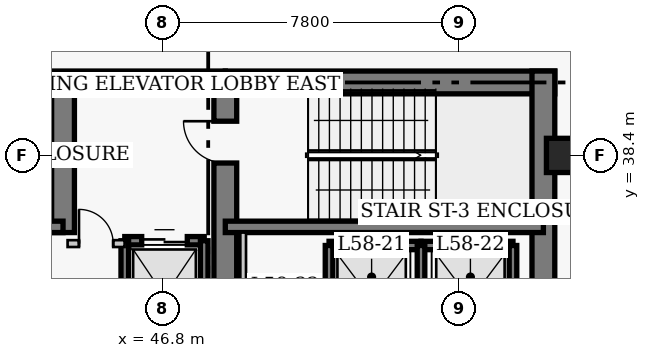
"""IFC4 building model, lengths in metres.
Left out: names, types, materials, properties, quantities, classifications, styles, units other than length and angle.
Written with IfcOpenShell. Run it as: python <this file> out.ifc"""

import sys

from ifc_helpers import new_model, si_unit, direction, frame, frame_2d, origin, origin_2d, place, context, subcontext, project, spatial, rectangle, extrude, element, fill, save


model = new_model("IFC4")
c1 = context("Model", 3, precision=1e-05, world=origin(), true_north=direction((0.0, 1.0)))
c2 = subcontext(c1, "Body", "Model", "MODEL_VIEW")
j1 = project(units=[si_unit("LENGTHUNIT", "METRE"), si_unit("PLANEANGLEUNIT", "RADIAN")], contexts=[c1])
p1 = place(None, origin())
s1 = spatial("IfcSite", under=j1, at=p1, CompositionType="ELEMENT")
p2 = place(p1, origin())
s2 = spatial("IfcBuilding", under=s1, at=p2, CompositionType="ELEMENT")
p3 = place(p2, frame((0.0, 0.0, 231.9)))
s3 = spatial("IfcBuildingStorey", under=s2, at=p3, CompositionType="ELEMENT", Elevation=231.9)
p4 = place(p3, frame((35.85, 40.32, 0.0), z_axis=(0.0, 0.0, 1.0), x_axis=(1.0, 0.0, 0.0)))
e1 = element("IfcWall", 1, at=p4, inside=s3, PredefinedType="SHEAR", context=c2, shape_type="SweptSolid", body=[
    extrude(rectangle(XDim=12.6, YDim=0.6, at=frame_2d((6.3, 0.0))), origin(), (0.0, 0.0, 1.0), 4.6),
])
p5 = place(p3, frame((48.45, 40.32, 0.0), z_axis=(0.0, 0.0, 1.0), x_axis=(1.0, 0.0, 0.0)))
e2 = element("IfcWall", 2, at=p5, inside=s3, PredefinedType="SHEAR", context=c2, shape_type="SweptSolid", body=[
    extrude(rectangle(XDim=8.67, YDim=0.6, at=frame_2d((4.335, 0.0))), origin(), (0.0, 0.0, 1.0), 4.6),
])
p6 = place(p3, frame((56.82, 27.05, 0.0), z_axis=(0.0, 0.0, 1.0), x_axis=(0.0, 1.0, 0.0)))
e3 = element("IfcWall", 3, at=p6, inside=s3, PredefinedType="SHEAR", context=c2, shape_type="SweptSolid", body=[
    extrude(rectangle(XDim=13.57, YDim=0.6, at=frame_2d((6.785, 0.0))), origin(), (0.0, 0.0, 1.0), 4.6),
])
p7 = place(p3, frame((44.18, 36.37, 0.0), z_axis=(0.0, 0.0, 1.0), x_axis=(0.0, 1.0, 0.0)))
e4 = element("IfcWall", 4, at=p7, inside=s3, PredefinedType="SHEAR", context=c2, shape_type="SweptSolid", body=[
    extrude(rectangle(XDim=3.95, YDim=0.6, at=frame_2d((1.975, 0.0))), origin(), (0.0, 0.0, 1.0), 4.6),
])
p8 = place(p3, frame((48.45, 32.45, 0.0), z_axis=(0.0, 0.0, 1.0), x_axis=(0.0, 1.0, 0.0)))
e5 = element("IfcWall", 5, at=p8, inside=s3, PredefinedType="SHEAR", context=c2, shape_type="SweptSolid", body=[
    extrude(rectangle(XDim=7.87, YDim=0.6, at=frame_2d((3.935, 0.0))), origin(), (0.0, 0.0, 1.0), 4.6),
])
p9 = place(p8, frame((5.75, 0.0, 0.0)))
e6 = element("IfcOpeningElement", 6, at=p9, cuts=e5, PredefinedType="OPENING", context=c2, shape_type="SweptSolid", body=[
    extrude(rectangle(XDim=1.1, YDim=2.15, at=frame_2d((0.55, 1.075))), frame((0.0, 0.31, 0.0), z_axis=(0.0, -1.0, 0.0), x_axis=(1.0, 0.0, 0.0)), (0.0, 0.0, 1.0), 0.62),
])
p10 = place(p3, frame((35.85, 36.52, 0.0), z_axis=(0.0, 0.0, 1.0), x_axis=(1.0, 0.0, 0.0)))
e7 = element("IfcWall", 7, at=p10, inside=s3, PredefinedType="SHEAR", context=c2, shape_type="SweptSolid", body=[
    extrude(rectangle(XDim=8.33, YDim=0.3, at=frame_2d((4.165, 0.0))), origin(), (0.0, 0.0, 1.0), 4.6),
])
p11 = place(p3, frame((48.45, 36.52, 0.0), z_axis=(0.0, 0.0, 1.0), x_axis=(1.0, 0.0, 0.0)))
e8 = element("IfcWall", 8, at=p11, inside=s3, PredefinedType="SHEAR", context=c2, shape_type="SweptSolid", body=[
    extrude(rectangle(XDim=8.37, YDim=0.3, at=frame_2d((4.185, 0.0))), origin(), (0.0, 0.0, 1.0), 4.6),
])
p12 = place(p3, frame((57.35, 38.4, 0.0), z_axis=(0.0, 0.0, 1.0), x_axis=(1.0, 0.0, 0.0)))
e9 = element("IfcColumn", 9, at=p12, inside=s3, PredefinedType="COLUMN", context=c2, shape_type="SweptSolid", body=[
    extrude(rectangle(XDim=0.9, YDim=0.9, at=origin_2d()), origin(), (0.0, 0.0, 1.0), 4.6),
])
p13 = place(p3, frame((51.18, 36.03, 0.0), z_axis=(0.0, 0.0, 1.0), x_axis=(1.0, 0.0, 0.0)))
e10 = element("IfcWall", 10, at=p13, inside=s3, PredefinedType="SHEAR", context=c2, shape_type="SweptSolid", body=[
    extrude(rectangle(XDim=2.42, YDim=0.22, at=frame_2d((1.21, 0.0))), origin(), (0.0, 0.0, 1.0), 4.6),
])
p14 = place(p3, frame((51.18, 33.17, 0.0), z_axis=(0.0, 0.0, 1.0), x_axis=(0.0, 1.0, 0.0)))
e11 = element("IfcWall", 11, at=p14, inside=s3, PredefinedType="SHEAR", context=c2, shape_type="SweptSolid", body=[
    extrude(rectangle(XDim=2.86, YDim=0.2, at=frame_2d((1.43, 0.0))), origin(), (0.0, 0.0, 1.0), 4.6),
])
p15 = place(p3, frame((53.6, 36.03, 0.0), z_axis=(0.0, 0.0, 1.0), x_axis=(1.0, 0.0, 0.0)))
e12 = element("IfcWall", 12, at=p15, inside=s3, PredefinedType="SHEAR", context=c2, shape_type="SweptSolid", body=[
    extrude(rectangle(XDim=2.42, YDim=0.22, at=frame_2d((1.21, 0.0))), origin(), (0.0, 0.0, 1.0), 4.6),
])
for number, where, z_axis, x_axis in (
    (13, (53.6, 33.17, 0.0), (0.0, 0.0, 1.0), (0.0, 1.0, 0.0)),
    (14, (56.02, 33.17, 0.0), (0.0, 0.0, 1.0), (0.0, 1.0, 0.0)),
):
    element("IfcWall", number, at=place(p3, frame(where, z_axis=z_axis, x_axis=x_axis)), inside=s3, PredefinedType="SHEAR", context=c2, shape_type="SweptSolid", body=[
        extrude(rectangle(XDim=2.86, YDim=0.2, at=frame_2d((1.43, 0.0))), origin(), (0.0, 0.0, 1.0), 4.6),
    ])
p16 = place(p3, frame((45.805, 36.155, 0.0), z_axis=(0.0, 0.0, 1.0), x_axis=(1.0, 0.0, 0.0)))
e15 = element("IfcWall", 15, at=p16, inside=s3, PredefinedType="SHEAR", context=c2, shape_type="SweptSolid", body=[
    extrude(rectangle(XDim=2.09, YDim=0.22, at=frame_2d((1.045, 0.0))), origin(), (0.0, 0.0, 1.0), 4.6),
])
p17 = place(p16, frame((0.445, 0.0, 0.0)))
e16 = element("IfcOpeningElement", 16, at=p17, cuts=e15, PredefinedType="OPENING", context=c2, shape_type="SweptSolid", body=[
    extrude(rectangle(XDim=1.2, YDim=2.15, at=frame_2d((0.6, 1.075))), frame((0.0, 0.12, 0.0), z_axis=(0.0, -1.0, 0.0), x_axis=(1.0, 0.0, 0.0)), (0.0, 0.0, 1.0), 0.24),
])
p18 = place(p3, frame((45.805, 32.65, 0.0), z_axis=(0.0, 0.0, 1.0), x_axis=(0.0, 1.0, 0.0)))
e17 = element("IfcWall", 17, at=p18, inside=s3, PredefinedType="SHEAR", context=c2, shape_type="SweptSolid", body=[
    extrude(rectangle(XDim=3.505, YDim=0.2, at=frame_2d((1.752, 0.0))), origin(), (0.0, 0.0, 1.0), 4.6),
])
p19 = place(p3, frame((47.895, 33.245, 0.0), z_axis=(0.0, 0.0, 1.0), x_axis=(0.0, 1.0, 0.0)))
e18 = element("IfcWall", 18, at=p19, inside=s3, PredefinedType="SHEAR", context=c2, shape_type="SweptSolid", body=[
    extrude(rectangle(XDim=2.91, YDim=0.2, at=frame_2d((1.455, 0.0))), origin(), (0.0, 0.0, 1.0), 4.6),
])
p20 = place(p3, frame((44.3, 36.08, 0.0), z_axis=(0.0, 0.0, 1.0), x_axis=(1.0, 0.0, 0.0)))
e19 = element("IfcWall", 19, at=p20, inside=s3, PredefinedType="PARTITIONING", context=c2, shape_type="SweptSolid", body=[
    extrude(rectangle(XDim=1.5, YDim=0.18, at=frame_2d((0.75, 0.0))), origin(), (0.0, 0.0, 1.0), 4.35),
])
p21 = place(p20, frame((0.3, 0.0, 0.0)))
e20 = element("IfcOpeningElement", 20, at=p21, cuts=e19, PredefinedType="OPENING", context=c2, shape_type="SweptSolid", body=[
    extrude(rectangle(XDim=0.9, YDim=2.15, at=frame_2d((0.45, 1.075))), frame((0.0, 0.1, 0.0), z_axis=(0.0, -1.0, 0.0), x_axis=(1.0, 0.0, 0.0)), (0.0, 0.0, 1.0), 0.2),
])
p22 = place(p3, frame((48.92, 32.75, 0.0), z_axis=(0.0, 0.0, 1.0), x_axis=(0.0, 1.0, 0.0)))
e21 = element("IfcWall", 21, at=p22, inside=s3, PredefinedType="PARTITIONING", context=c2, shape_type="SweptSolid", body=[
    extrude(rectangle(XDim=3.62, YDim=0.15, at=frame_2d((1.81, 0.0))), origin(), (0.0, 0.0, 1.0), 4.35),
])
p23 = place(p17, origin())
e22 = element("IfcDoor", 22, at=p23, inside=s3, OperationType="DOUBLE_DOOR_SLIDING", PredefinedType="DOOR", context=c2, shape_type="SweptSolid", body=[
    extrude(rectangle(XDim=1.2, YDim=2.15, at=frame_2d((0.6, 1.075))), frame((0.0, 0.025, 0.0), z_axis=(0.0, -1.0, 0.0), x_axis=(1.0, 0.0, 0.0)), (0.0, 0.0, 1.0), 0.05),
])
fill(e16, e22)
p24 = place(p21, origin())
e23 = element("IfcDoor", 23, at=p24, inside=s3, OperationType="SINGLE_SWING_LEFT", PredefinedType="DOOR", context=c2, shape_type="SweptSolid", body=[
    extrude(rectangle(XDim=0.9, YDim=2.15, at=frame_2d((0.45, 1.075))), frame((0.0, 0.025, 0.0), z_axis=(0.0, -1.0, 0.0), x_axis=(1.0, 0.0, 0.0)), (0.0, 0.0, 1.0), 0.05),
])
fill(e20, e23)
p25 = place(p9, origin())
e24 = element("IfcDoor", 24, at=p25, inside=s3, OperationType="SINGLE_SWING_RIGHT", PredefinedType="DOOR", context=c2, shape_type="SweptSolid", body=[
    extrude(rectangle(XDim=1.1, YDim=2.15, at=frame_2d((0.55, 1.075))), frame((0.0, 0.025, 0.0), z_axis=(0.0, -1.0, 0.0), x_axis=(1.0, 0.0, 0.0)), (0.0, 0.0, 1.0), 0.05),
])
fill(e6, e24)
save(model, sys.argv[1])
